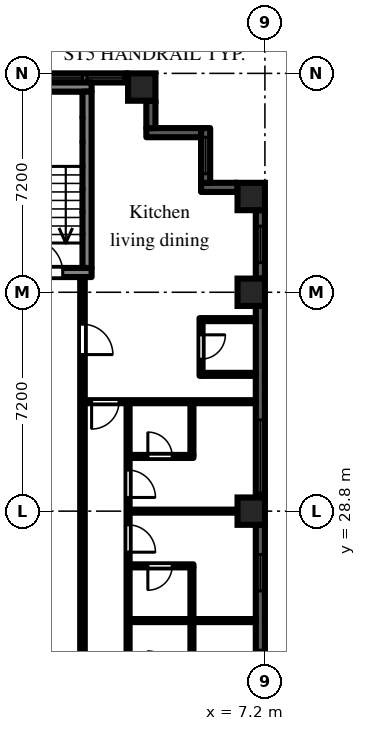
"""IFC4 building model, lengths in metres.
Left out: names, types, materials, properties, quantities, classifications, styles, units other than length and angle.
Written with IfcOpenShell. Run it as: python <this file> out.ifc"""

import sys

from ifc_helpers import new_model, si_unit, direction, frame, frame_2d, origin, origin_2d, place, context, subcontext, project, spatial, rectangle, extrude, element, fill, save


model = new_model("IFC4")
c1 = context("Model", 3, precision=1e-05, world=origin(), true_north=direction((0.0, 1.0)))
c2 = subcontext(c1, "Body", "Model", "MODEL_VIEW")
j1 = project(units=[si_unit("LENGTHUNIT", "METRE"), si_unit("PLANEANGLEUNIT", "RADIAN")], contexts=[c1])
p1 = place(None, origin())
s1 = spatial("IfcSite", under=j1, at=p1, CompositionType="ELEMENT")
p2 = place(p1, origin())
s2 = spatial("IfcBuilding", under=s1, at=p2, CompositionType="ELEMENT")
p3 = place(p2, frame((0.0, 0.0, 35.7)))
s3 = spatial("IfcBuildingStorey", under=s2, at=p3, CompositionType="ELEMENT", Elevation=35.7)
for number, where, z_axis, x_axis in (
    (1, (3.15, 42.75, 0.0), (0.0, 0.0, 1.0), (1.0, 0.0, 0.0)),
    (2, (6.75, 28.8, 0.0), (0.0, 0.0, 1.0), (1.0, 0.0, 0.0)),
    (3, (6.75, 36.0, 0.0), (0.0, 0.0, 1.0), (1.0, 0.0, 0.0)),
    (4, (6.75, 39.15, 0.0), (0.0, 0.0, 1.0), (1.0, 0.0, 0.0)),
):
    element("IfcColumn", number, at=place(p3, frame(where, z_axis=z_axis, x_axis=x_axis)), inside=s3, PredefinedType="COLUMN", context=c2, shape_type="SweptSolid", body=[
        extrude(rectangle(XDim=0.9, YDim=0.9, at=origin_2d()), origin(), (0.0, 0.0, 1.0), 3.0),
    ])
p4 = place(p3, frame((7.05, 22.05, 0.0), z_axis=(0.0, 0.0, 1.0), x_axis=(0.0, 1.0, 0.0)))
e5 = element("IfcWall", 5, at=p4, inside=s3, PredefinedType="SOLIDWALL", context=c2, shape_type="SweptSolid", body=[
    extrude(rectangle(XDim=6.3, YDim=0.3, at=frame_2d((3.15, 0.0))), origin(), (0.0, 0.0, 1.0), 2.1),
])
p5 = place(p4, frame((0.975, 0.0, 0.2)))
e6 = element("IfcOpeningElement", 6, at=p5, cuts=e5, PredefinedType="OPENING", context=c2, shape_type="SweptSolid", body=[
    extrude(rectangle(XDim=1.2, YDim=1.85, at=frame_2d((0.6, 0.925))), frame((0.0, 0.16, 0.0), z_axis=(0.0, -1.0, 0.0), x_axis=(1.0, 0.0, 0.0)), (0.0, 0.0, 1.0), 0.32),
])
p6 = place(p4, frame((4.125, 0.0, 0.2)))
e7 = element("IfcOpeningElement", 7, at=p6, cuts=e5, PredefinedType="OPENING", context=c2, shape_type="SweptSolid", body=[
    extrude(rectangle(XDim=1.2, YDim=1.85, at=frame_2d((0.6, 0.925))), frame((0.0, 0.16, 0.0), z_axis=(0.0, -1.0, 0.0), x_axis=(1.0, 0.0, 0.0)), (0.0, 0.0, 1.0), 0.32),
])
p7 = place(p3, frame((7.05, 29.25, 0.0), z_axis=(0.0, 0.0, 1.0), x_axis=(0.0, 1.0, 0.0)))
e8 = element("IfcWall", 8, at=p7, inside=s3, PredefinedType="SOLIDWALL", context=c2, shape_type="SweptSolid", body=[
    extrude(rectangle(XDim=6.3, YDim=0.3, at=frame_2d((3.15, 0.0))), origin(), (0.0, 0.0, 1.0), 2.1),
])
p8 = place(p7, frame((0.15, 0.0, 0.2)))
e9 = element("IfcOpeningElement", 9, at=p8, cuts=e8, PredefinedType="OPENING", context=c2, shape_type="SweptSolid", body=[
    extrude(rectangle(XDim=2.4, YDim=1.85, at=frame_2d((1.2, 0.925))), frame((0.0, 0.16, 0.0), z_axis=(0.0, -1.0, 0.0), x_axis=(1.0, 0.0, 0.0)), (0.0, 0.0, 1.0), 0.32),
])
p9 = place(p3, frame((7.05, 36.45, 0.0), z_axis=(0.0, 0.0, 1.0), x_axis=(0.0, 1.0, 0.0)))
e10 = element("IfcWall", 10, at=p9, inside=s3, PredefinedType="SOLIDWALL", context=c2, shape_type="SweptSolid", body=[
    extrude(rectangle(XDim=2.25, YDim=0.3, at=frame_2d((1.125, 0.0))), origin(), (0.0, 0.0, 1.0), 2.1),
])
p10 = place(p9, frame((0.525, 0.0, 0.2)))
e11 = element("IfcOpeningElement", 11, at=p10, cuts=e10, PredefinedType="OPENING", context=c2, shape_type="SweptSolid", body=[
    extrude(rectangle(XDim=1.2, YDim=1.85, at=frame_2d((0.6, 0.925))), frame((0.0, 0.16, 0.0), z_axis=(0.0, -1.0, 0.0), x_axis=(1.0, 0.0, 0.0)), (0.0, 0.0, 1.0), 0.32),
])
p11 = place(p3, frame((6.3, 39.45, 0.0), z_axis=(0.0, 0.0, 1.0), x_axis=(-1.0, 0.0, 0.0)))
e12 = element("IfcWall", 12, at=p11, inside=s3, PredefinedType="SOLIDWALL", context=c2, shape_type="SweptSolid", body=[
    extrude(rectangle(XDim=1.2, YDim=0.3, at=frame_2d((0.6, 0.0))), origin(), (0.0, 0.0, 1.0), 2.575),
])
p12 = place(p3, frame((5.25, 39.6, 0.0), z_axis=(0.0, 0.0, 1.0), x_axis=(0.0, 1.0, 0.0)))
e13 = element("IfcWall", 13, at=p12, inside=s3, PredefinedType="SOLIDWALL", context=c2, shape_type="SweptSolid", body=[
    extrude(rectangle(XDim=1.8, YDim=0.3, at=frame_2d((0.9, 0.0))), origin(), (0.0, 0.0, 1.0), 2.575),
])
p13 = place(p12, frame((0.3, 0.0, 0.2)))
e14 = element("IfcOpeningElement", 14, at=p13, cuts=e13, PredefinedType="OPENING", context=c2, shape_type="SweptSolid", body=[
    extrude(rectangle(XDim=1.2, YDim=1.85, at=frame_2d((0.6, 0.925))), frame((0.0, 0.16, 0.0), z_axis=(0.0, -1.0, 0.0), x_axis=(1.0, 0.0, 0.0)), (0.0, 0.0, 1.0), 0.32),
])
p14 = place(p3, frame((5.1, 41.25, 0.0), z_axis=(0.0, 0.0, 1.0), x_axis=(-1.0, 0.0, 0.0)))
e15 = element("IfcWall", 15, at=p14, inside=s3, PredefinedType="SOLIDWALL", context=c2, shape_type="SweptSolid", body=[
    extrude(rectangle(XDim=1.8, YDim=0.3, at=frame_2d((0.9, 0.0))), origin(), (0.0, 0.0, 1.0), 2.575),
])
p15 = place(p3, frame((3.45, 41.4, 0.0), z_axis=(0.0, 0.0, 1.0), x_axis=(0.0, 1.0, 0.0)))
e16 = element("IfcWall", 16, at=p15, inside=s3, PredefinedType="SOLIDWALL", context=c2, shape_type="SweptSolid", body=[
    extrude(rectangle(XDim=0.9, YDim=0.3, at=frame_2d((0.45, 0.0))), origin(), (0.0, 0.0, 1.0), 2.575),
])
p16 = place(p3, frame((2.7, 43.05, 0.0), z_axis=(0.0, 0.0, 1.0), x_axis=(-1.0, 0.0, 0.0)))
e17 = element("IfcWall", 17, at=p16, inside=s3, PredefinedType="SOLIDWALL", context=c2, shape_type="SweptSolid", body=[
    extrude(rectangle(XDim=5.4, YDim=0.3, at=frame_2d((2.7, 0.0))), origin(), (0.0, 0.0, 1.0), 2.1),
])
p17 = place(p16, frame((1.5, 0.0, 0.2)))
e18 = element("IfcOpeningElement", 18, at=p17, cuts=e17, PredefinedType="OPENING", context=c2, shape_type="SweptSolid", body=[
    extrude(rectangle(XDim=2.4, YDim=1.85, at=frame_2d((1.2, 0.925))), frame((0.0, 0.16, 0.0), z_axis=(0.0, -1.0, 0.0), x_axis=(1.0, 0.0, 0.0)), (0.0, 0.0, 1.0), 0.32),
])
p18 = place(p16, frame((0.15, 0.0, 0.2)))
e19 = element("IfcOpeningElement", 19, at=p18, cuts=e17, PredefinedType="OPENING", context=c2, shape_type="SweptSolid", body=[
    extrude(rectangle(XDim=1.2, YDim=1.85, at=frame_2d((0.6, 0.925))), frame((0.0, 0.16, 0.0), z_axis=(0.0, -1.0, 0.0), x_axis=(1.0, 0.0, 0.0)), (0.0, 0.0, 1.0), 0.32),
])
p19 = place(p16, frame((4.05, 0.0, 0.2)))
e20 = element("IfcOpeningElement", 20, at=p19, cuts=e17, PredefinedType="OPENING", context=c2, shape_type="SweptSolid", body=[
    extrude(rectangle(XDim=1.2, YDim=1.85, at=frame_2d((0.6, 0.925))), frame((0.0, 0.16, 0.0), z_axis=(0.0, -1.0, 0.0), x_axis=(1.0, 0.0, 0.0)), (0.0, 0.0, 1.0), 0.32),
])
p20 = place(p3, frame((-1.5, 36.65, 0.0), z_axis=(0.0, 0.0, 1.0), x_axis=(1.0, 0.0, 0.0)))
e21 = element("IfcWall", 21, at=p20, inside=s3, PredefinedType="SHEAR", context=c2, shape_type="SweptSolid", body=[
    extrude(rectangle(XDim=3.0, YDim=0.3, at=frame_2d((1.5, 0.0))), origin(), (0.0, 0.0, 1.0), 2.575),
])
p21 = place(p20, frame((0.95, 0.0, 0.0)))
e22 = element("IfcOpeningElement", 22, at=p21, cuts=e21, PredefinedType="OPENING", context=c2, shape_type="SweptSolid", body=[
    extrude(rectangle(XDim=1.1, YDim=2.1, at=frame_2d((0.55, 1.05))), frame((0.0, 0.16, 0.0), z_axis=(0.0, -1.0, 0.0), x_axis=(1.0, 0.0, 0.0)), (0.0, 0.0, 1.0), 0.32),
])
p22 = place(p3, frame((-1.5, 42.75, 0.0), z_axis=(0.0, 0.0, 1.0), x_axis=(1.0, 0.0, 0.0)))
e23 = element("IfcWall", 23, at=p22, inside=s3, PredefinedType="SHEAR", context=c2, shape_type="SweptSolid", body=[
    extrude(rectangle(XDim=3.0, YDim=0.3, at=frame_2d((1.5, 0.0))), origin(), (0.0, 0.0, 1.0), 2.575),
])
p23 = place(p3, frame((1.35, 36.8, 0.0), z_axis=(0.0, 0.0, 1.0), x_axis=(0.0, 1.0, 0.0)))
e24 = element("IfcWall", 24, at=p23, inside=s3, PredefinedType="SHEAR", context=c2, shape_type="SweptSolid", body=[
    extrude(rectangle(XDim=5.8, YDim=0.3, at=frame_2d((2.9, 0.0))), origin(), (0.0, 0.0, 1.0), 2.575),
])
p24 = place(p3, frame((1.2, 1.125, 0.0), z_axis=(0.0, 0.0, 1.0), x_axis=(0.0, 1.0, 0.0)))
e25 = element("IfcWall", 25, at=p24, inside=s3, PredefinedType="PARTITIONING", context=c2, shape_type="SweptSolid", body=[
    extrude(rectangle(XDim=35.375, YDim=0.15, at=frame_2d((17.688, 0.0))), origin(), (0.0, 0.0, 1.0), 2.575),
])
p25 = place(p24, frame((4.125, 0.0, 0.0)))
e26 = element("IfcOpeningElement", 26, at=p25, cuts=e25, PredefinedType="OPENING", context=c2, shape_type="SweptSolid", body=[
    extrude(rectangle(XDim=0.9, YDim=2.1, at=frame_2d((0.45, 1.05))), frame((0.0, 0.085, 0.0), z_axis=(0.0, -1.0, 0.0), x_axis=(1.0, 0.0, 0.0)), (0.0, 0.0, 1.0), 0.17),
])
p26 = place(p24, frame((7.025, 0.0, 0.0)))
e27 = element("IfcOpeningElement", 27, at=p26, cuts=e25, PredefinedType="OPENING", context=c2, shape_type="SweptSolid", body=[
    extrude(rectangle(XDim=0.9, YDim=2.1, at=frame_2d((0.45, 1.05))), frame((0.0, 0.085, 0.0), z_axis=(0.0, -1.0, 0.0), x_axis=(1.0, 0.0, 0.0)), (0.0, 0.0, 1.0), 0.17),
])
p27 = place(p24, frame((10.625, 0.0, 0.0)))
e28 = element("IfcOpeningElement", 28, at=p27, cuts=e25, PredefinedType="OPENING", context=c2, shape_type="SweptSolid", body=[
    extrude(rectangle(XDim=0.9, YDim=2.1, at=frame_2d((0.45, 1.05))), frame((0.0, 0.085, 0.0), z_axis=(0.0, -1.0, 0.0), x_axis=(1.0, 0.0, 0.0)), (0.0, 0.0, 1.0), 0.17),
])
p28 = place(p24, frame((32.825, 0.0, 0.0)))
e29 = element("IfcOpeningElement", 29, at=p28, cuts=e25, PredefinedType="OPENING", context=c2, shape_type="SweptSolid", body=[
    extrude(rectangle(XDim=1.0, YDim=2.1, at=frame_2d((0.5, 1.05))), frame((0.0, 0.085, 0.0), z_axis=(0.0, -1.0, 0.0), x_axis=(1.0, 0.0, 0.0)), (0.0, 0.0, 1.0), 0.17),
])
p29 = place(p3, frame((1.275, 32.4, 0.0), z_axis=(0.0, 0.0, 1.0), x_axis=(1.0, 0.0, 0.0)))
e30 = element("IfcWall", 30, at=p29, inside=s3, PredefinedType="PARTITIONING", context=c2, shape_type="SweptSolid", body=[
    extrude(rectangle(XDim=5.625, YDim=0.1, at=frame_2d((2.812, 0.0))), origin(), (0.0, 0.0, 1.0), 2.575),
])
p30 = place(p29, frame((0.225, 0.0, 0.0)))
e31 = element("IfcOpeningElement", 31, at=p30, cuts=e30, PredefinedType="OPENING", context=c2, shape_type="SweptSolid", body=[
    extrude(rectangle(XDim=0.9, YDim=2.1, at=frame_2d((0.45, 1.05))), frame((0.0, 0.06, 0.0), z_axis=(0.0, -1.0, 0.0), x_axis=(1.0, 0.0, 0.0)), (0.0, 0.0, 1.0), 0.12),
])
p31 = place(p3, frame((2.7, 14.462, 0.0), z_axis=(0.0, 0.0, 1.0), x_axis=(0.0, 1.0, 0.0)))
e32 = element("IfcWall", 32, at=p31, inside=s3, PredefinedType="PARTITIONING", context=c2, shape_type="SweptSolid", body=[
    extrude(rectangle(XDim=17.888, YDim=0.1, at=frame_2d((8.944, 0.0))), origin(), (0.0, 0.0, 1.0), 2.575),
])
p32 = place(p31, frame((2.188, 0.0, 0.0)))
e33 = element("IfcOpeningElement", 33, at=p32, cuts=e32, PredefinedType="OPENING", context=c2, shape_type="SweptSolid", body=[
    extrude(rectangle(XDim=0.9, YDim=2.1, at=frame_2d((0.45, 1.05))), frame((0.0, 0.06, 0.0), z_axis=(0.0, -1.0, 0.0), x_axis=(1.0, 0.0, 0.0)), (0.0, 0.0, 1.0), 0.12),
])
p33 = place(p31, frame((5.788, 0.0, 0.0)))
e34 = element("IfcOpeningElement", 34, at=p33, cuts=e32, PredefinedType="OPENING", context=c2, shape_type="SweptSolid", body=[
    extrude(rectangle(XDim=0.9, YDim=2.1, at=frame_2d((0.45, 1.05))), frame((0.0, 0.06, 0.0), z_axis=(0.0, -1.0, 0.0), x_axis=(1.0, 0.0, 0.0)), (0.0, 0.0, 1.0), 0.12),
])
p34 = place(p31, frame((7.587, 0.0, 0.0)))
e35 = element("IfcOpeningElement", 35, at=p34, cuts=e32, PredefinedType="OPENING", context=c2, shape_type="SweptSolid", body=[
    extrude(rectangle(XDim=0.9, YDim=2.1, at=frame_2d((0.45, 1.05))), frame((0.0, 0.06, 0.0), z_axis=(0.0, -1.0, 0.0), x_axis=(1.0, 0.0, 0.0)), (0.0, 0.0, 1.0), 0.12),
])
p35 = place(p31, frame((12.988, 0.0, 0.0)))
e36 = element("IfcOpeningElement", 36, at=p35, cuts=e32, PredefinedType="OPENING", context=c2, shape_type="SweptSolid", body=[
    extrude(rectangle(XDim=0.9, YDim=2.1, at=frame_2d((0.45, 1.05))), frame((0.0, 0.06, 0.0), z_axis=(0.0, -1.0, 0.0), x_axis=(1.0, 0.0, 0.0)), (0.0, 0.0, 1.0), 0.12),
])
p36 = place(p31, frame((14.788, 0.0, 0.0)))
e37 = element("IfcOpeningElement", 37, at=p36, cuts=e32, PredefinedType="OPENING", context=c2, shape_type="SweptSolid", body=[
    extrude(rectangle(XDim=0.9, YDim=2.1, at=frame_2d((0.45, 1.05))), frame((0.0, 0.06, 0.0), z_axis=(0.0, -1.0, 0.0), x_axis=(1.0, 0.0, 0.0)), (0.0, 0.0, 1.0), 0.12),
])
p37 = place(p3, frame((2.75, 25.2, 0.0), z_axis=(0.0, 0.0, 1.0), x_axis=(1.0, 0.0, 0.0)))
e38 = element("IfcWall", 38, at=p37, inside=s3, PredefinedType="PARTITIONING", context=c2, shape_type="SweptSolid", body=[
    extrude(rectangle(XDim=4.15, YDim=0.1, at=frame_2d((2.075, 0.0))), origin(), (0.0, 0.0, 1.0), 2.575),
])
p38 = place(p3, frame((2.75, 27.0, 0.0), z_axis=(0.0, 0.0, 1.0), x_axis=(1.0, 0.0, 0.0)))
e39 = element("IfcWall", 39, at=p38, inside=s3, PredefinedType="PARTITIONING", context=c2, shape_type="SweptSolid", body=[
    extrude(rectangle(XDim=2.1, YDim=0.1, at=frame_2d((1.05, 0.0))), origin(), (0.0, 0.0, 1.0), 2.575),
])
p39 = place(p38, frame((0.6, 0.0, 0.0)))
e40 = element("IfcOpeningElement", 40, at=p39, cuts=e39, PredefinedType="OPENING", context=c2, shape_type="SweptSolid", body=[
    extrude(rectangle(XDim=0.8, YDim=2.1, at=frame_2d((0.4, 1.05))), frame((0.0, 0.06, 0.0), z_axis=(0.0, -1.0, 0.0), x_axis=(1.0, 0.0, 0.0)), (0.0, 0.0, 1.0), 0.12),
])
p40 = place(p3, frame((2.75, 28.8, 0.0), z_axis=(0.0, 0.0, 1.0), x_axis=(1.0, 0.0, 0.0)))
e41 = element("IfcWall", 41, at=p40, inside=s3, PredefinedType="PARTITIONING", context=c2, shape_type="SweptSolid", body=[
    extrude(rectangle(XDim=4.15, YDim=0.1, at=frame_2d((2.075, 0.0))), origin(), (0.0, 0.0, 1.0), 2.575),
])
p41 = place(p3, frame((2.75, 30.6, 0.0), z_axis=(0.0, 0.0, 1.0), x_axis=(1.0, 0.0, 0.0)))
e42 = element("IfcWall", 42, at=p41, inside=s3, PredefinedType="PARTITIONING", context=c2, shape_type="SweptSolid", body=[
    extrude(rectangle(XDim=2.1, YDim=0.1, at=frame_2d((1.05, 0.0))), origin(), (0.0, 0.0, 1.0), 2.575),
])
p42 = place(p41, frame((0.6, 0.0, 0.0)))
e43 = element("IfcOpeningElement", 43, at=p42, cuts=e42, PredefinedType="OPENING", context=c2, shape_type="SweptSolid", body=[
    extrude(rectangle(XDim=0.8, YDim=2.1, at=frame_2d((0.4, 1.05))), frame((0.0, 0.06, 0.0), z_axis=(0.0, -1.0, 0.0), x_axis=(1.0, 0.0, 0.0)), (0.0, 0.0, 1.0), 0.12),
])
p43 = place(p3, frame((4.8, 23.45, 0.0), z_axis=(0.0, 0.0, 1.0), x_axis=(0.0, 1.0, 0.0)))
e44 = element("IfcWall", 44, at=p43, inside=s3, PredefinedType="PARTITIONING", context=c2, shape_type="SweptSolid", body=[
    extrude(rectangle(XDim=3.5, YDim=0.1, at=frame_2d((1.75, 0.0))), origin(), (0.0, 0.0, 1.0), 2.575),
])
p44 = place(p3, frame((4.8, 30.65, 0.0), z_axis=(0.0, 0.0, 1.0), x_axis=(0.0, 1.0, 0.0)))
e45 = element("IfcWall", 45, at=p44, inside=s3, PredefinedType="PARTITIONING", context=c2, shape_type="SweptSolid", body=[
    extrude(rectangle(XDim=1.7, YDim=0.1, at=frame_2d((0.85, 0.0))), origin(), (0.0, 0.0, 1.0), 2.575),
])
p45 = place(p3, frame((5.1, 33.25, 0.0), z_axis=(0.0, 0.0, 1.0), x_axis=(0.0, 1.0, 0.0)))
e46 = element("IfcWall", 46, at=p45, inside=s3, PredefinedType="PARTITIONING", context=c2, shape_type="SweptSolid", body=[
    extrude(rectangle(XDim=1.9, YDim=0.1, at=frame_2d((0.95, 0.0))), origin(), (0.0, 0.0, 1.0), 2.575),
])
p46 = place(p45, frame((0.55, 0.0, 0.0)))
e47 = element("IfcOpeningElement", 47, at=p46, cuts=e46, PredefinedType="OPENING", context=c2, shape_type="SweptSolid", body=[
    extrude(rectangle(XDim=0.8, YDim=2.1, at=frame_2d((0.4, 1.05))), frame((0.0, 0.06, 0.0), z_axis=(0.0, -1.0, 0.0), x_axis=(1.0, 0.0, 0.0)), (0.0, 0.0, 1.0), 0.12),
])
for number, where, z_axis, x_axis in (
    (48, (5.15, 33.3, 0.0), (0.0, 0.0, 1.0), (1.0, 0.0, 0.0)),
    (49, (5.15, 35.1, 0.0), (0.0, 0.0, 1.0), (1.0, 0.0, 0.0)),
):
    element("IfcWall", number, at=place(p3, frame(where, z_axis=z_axis, x_axis=x_axis)), inside=s3, PredefinedType="PARTITIONING", context=c2, shape_type="SweptSolid", body=[
        extrude(rectangle(XDim=1.75, YDim=0.1, at=frame_2d((0.875, 0.0))), origin(), (0.0, 0.0, 1.0), 2.575),
    ])
p47 = place(p5, origin())
e50 = element("IfcWindow", 50, at=p47, inside=s3, PartitioningType="SINGLE_PANEL", PredefinedType="WINDOW", context=c2, shape_type="SweptSolid", body=[
    extrude(rectangle(XDim=1.2, YDim=1.85, at=frame_2d((0.6, 0.925))), frame((0.0, 0.03, 0.0), z_axis=(0.0, -1.0, 0.0), x_axis=(1.0, 0.0, 0.0)), (0.0, 0.0, 1.0), 0.06),
])
fill(e6, e50)
p48 = place(p6, origin())
e51 = element("IfcWindow", 51, at=p48, inside=s3, PartitioningType="SINGLE_PANEL", PredefinedType="WINDOW", context=c2, shape_type="SweptSolid", body=[
    extrude(rectangle(XDim=1.2, YDim=1.85, at=frame_2d((0.6, 0.925))), frame((0.0, 0.03, 0.0), z_axis=(0.0, -1.0, 0.0), x_axis=(1.0, 0.0, 0.0)), (0.0, 0.0, 1.0), 0.06),
])
fill(e7, e51)
p49 = place(p8, origin())
e52 = element("IfcWindow", 52, at=p49, inside=s3, PartitioningType="SINGLE_PANEL", PredefinedType="WINDOW", context=c2, shape_type="SweptSolid", body=[
    extrude(rectangle(XDim=2.4, YDim=1.85, at=frame_2d((1.2, 0.925))), frame((0.0, 0.03, 0.0), z_axis=(0.0, -1.0, 0.0), x_axis=(1.0, 0.0, 0.0)), (0.0, 0.0, 1.0), 0.06),
])
fill(e9, e52)
p50 = place(p10, origin())
e53 = element("IfcWindow", 53, at=p50, inside=s3, PartitioningType="SINGLE_PANEL", PredefinedType="WINDOW", context=c2, shape_type="SweptSolid", body=[
    extrude(rectangle(XDim=1.2, YDim=1.85, at=frame_2d((0.6, 0.925))), frame((0.0, 0.03, 0.0), z_axis=(0.0, -1.0, 0.0), x_axis=(1.0, 0.0, 0.0)), (0.0, 0.0, 1.0), 0.06),
])
fill(e11, e53)
p51 = place(p13, origin())
e54 = element("IfcWindow", 54, at=p51, inside=s3, PartitioningType="SINGLE_PANEL", PredefinedType="WINDOW", context=c2, shape_type="SweptSolid", body=[
    extrude(rectangle(XDim=1.2, YDim=1.85, at=frame_2d((0.6, 0.925))), frame((0.0, 0.03, 0.0), z_axis=(0.0, -1.0, 0.0), x_axis=(1.0, 0.0, 0.0)), (0.0, 0.0, 1.0), 0.06),
])
fill(e14, e54)
p52 = place(p17, origin())
e55 = element("IfcWindow", 55, at=p52, inside=s3, PartitioningType="SINGLE_PANEL", PredefinedType="WINDOW", context=c2, shape_type="SweptSolid", body=[
    extrude(rectangle(XDim=2.4, YDim=1.85, at=frame_2d((1.2, 0.925))), frame((0.0, 0.03, 0.0), z_axis=(0.0, -1.0, 0.0), x_axis=(1.0, 0.0, 0.0)), (0.0, 0.0, 1.0), 0.06),
])
fill(e18, e55)
p53 = place(p18, origin())
e56 = element("IfcWindow", 56, at=p53, inside=s3, PartitioningType="SINGLE_PANEL", PredefinedType="WINDOW", context=c2, shape_type="SweptSolid", body=[
    extrude(rectangle(XDim=1.2, YDim=1.85, at=frame_2d((0.6, 0.925))), frame((0.0, 0.03, 0.0), z_axis=(0.0, -1.0, 0.0), x_axis=(1.0, 0.0, 0.0)), (0.0, 0.0, 1.0), 0.06),
])
fill(e19, e56)
p54 = place(p21, origin())
e57 = element("IfcDoor", 57, at=p54, inside=s3, OperationType="SINGLE_SWING_LEFT", PredefinedType="DOOR", context=c2, shape_type="SweptSolid", body=[
    extrude(rectangle(XDim=1.1, YDim=2.1, at=frame_2d((0.55, 1.05))), frame((0.0, 0.025, 0.0), z_axis=(0.0, -1.0, 0.0), x_axis=(1.0, 0.0, 0.0)), (0.0, 0.0, 1.0), 0.05),
])
fill(e22, e57)
p55 = place(p46, frame((0.8, 0.0, 0.0), z_axis=(0.0, 0.0, 1.0), x_axis=(-1.0, 0.0, 0.0)))
e58 = element("IfcDoor", 58, at=p55, inside=s3, OperationType="SINGLE_SWING_LEFT", PredefinedType="DOOR", context=c2, shape_type="SweptSolid", body=[
    extrude(rectangle(XDim=0.8, YDim=2.1, at=frame_2d((0.4, 1.05))), frame((0.0, 0.025, 0.0), z_axis=(0.0, -1.0, 0.0), x_axis=(1.0, 0.0, 0.0)), (0.0, 0.0, 1.0), 0.05),
])
fill(e47, e58)
p56 = place(p28, frame((1.0, 0.0, 0.0), z_axis=(0.0, 0.0, 1.0), x_axis=(-1.0, 0.0, 0.0)))
e59 = element("IfcDoor", 59, at=p56, inside=s3, OperationType="SINGLE_SWING_RIGHT", PredefinedType="DOOR", context=c2, shape_type="SweptSolid", body=[
    extrude(rectangle(XDim=1.0, YDim=2.1, at=frame_2d((0.5, 1.05))), frame((0.0, 0.025, 0.0), z_axis=(0.0, -1.0, 0.0), x_axis=(1.0, 0.0, 0.0)), (0.0, 0.0, 1.0), 0.05),
])
fill(e29, e59)
p57 = place(p30, frame((0.9, 0.0, 0.0), z_axis=(0.0, 0.0, 1.0), x_axis=(-1.0, 0.0, 0.0)))
e60 = element("IfcDoor", 60, at=p57, inside=s3, OperationType="SINGLE_SWING_RIGHT", PredefinedType="DOOR", context=c2, shape_type="SweptSolid", body=[
    extrude(rectangle(XDim=0.9, YDim=2.1, at=frame_2d((0.45, 1.05))), frame((0.0, 0.025, 0.0), z_axis=(0.0, -1.0, 0.0), x_axis=(1.0, 0.0, 0.0)), (0.0, 0.0, 1.0), 0.05),
])
fill(e31, e60)
p58 = place(p35, frame((0.9, 0.0, 0.0), z_axis=(0.0, 0.0, 1.0), x_axis=(-1.0, 0.0, 0.0)))
e61 = element("IfcDoor", 61, at=p58, inside=s3, OperationType="SINGLE_SWING_RIGHT", PredefinedType="DOOR", context=c2, shape_type="SweptSolid", body=[
    extrude(rectangle(XDim=0.9, YDim=2.1, at=frame_2d((0.45, 1.05))), frame((0.0, 0.025, 0.0), z_axis=(0.0, -1.0, 0.0), x_axis=(1.0, 0.0, 0.0)), (0.0, 0.0, 1.0), 0.05),
])
fill(e36, e61)
p59 = place(p36, frame((0.9, 0.0, 0.0), z_axis=(0.0, 0.0, 1.0), x_axis=(-1.0, 0.0, 0.0)))
e62 = element("IfcDoor", 62, at=p59, inside=s3, OperationType="SINGLE_SWING_RIGHT", PredefinedType="DOOR", context=c2, shape_type="SweptSolid", body=[
    extrude(rectangle(XDim=0.9, YDim=2.1, at=frame_2d((0.45, 1.05))), frame((0.0, 0.025, 0.0), z_axis=(0.0, -1.0, 0.0), x_axis=(1.0, 0.0, 0.0)), (0.0, 0.0, 1.0), 0.05),
])
fill(e37, e62)
p60 = place(p39, frame((0.8, 0.0, 0.0), z_axis=(0.0, 0.0, 1.0), x_axis=(-1.0, 0.0, 0.0)))
e63 = element("IfcDoor", 63, at=p60, inside=s3, OperationType="SINGLE_SWING_RIGHT", PredefinedType="DOOR", context=c2, shape_type="SweptSolid", body=[
    extrude(rectangle(XDim=0.8, YDim=2.1, at=frame_2d((0.4, 1.05))), frame((0.0, 0.025, 0.0), z_axis=(0.0, -1.0, 0.0), x_axis=(1.0, 0.0, 0.0)), (0.0, 0.0, 1.0), 0.05),
])
fill(e40, e63)
p61 = place(p42, origin())
e64 = element("IfcDoor", 64, at=p61, inside=s3, OperationType="SINGLE_SWING_LEFT", PredefinedType="DOOR", context=c2, shape_type="SweptSolid", body=[
    extrude(rectangle(XDim=0.8, YDim=2.1, at=frame_2d((0.4, 1.05))), frame((0.0, 0.025, 0.0), z_axis=(0.0, -1.0, 0.0), x_axis=(1.0, 0.0, 0.0)), (0.0, 0.0, 1.0), 0.05),
])
fill(e43, e64)
save(model, sys.argv[1])
